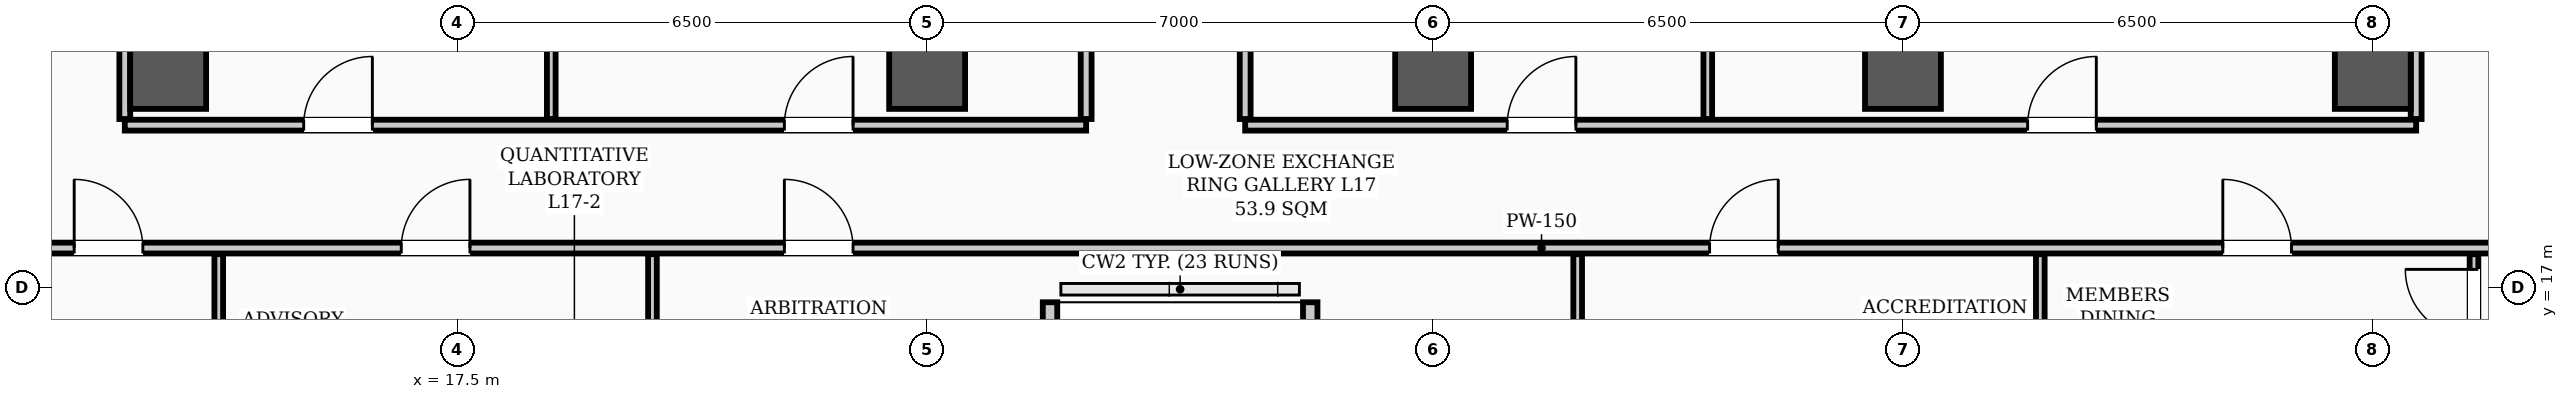
"""IFC4 building model, lengths in metres.
Left out: names, types, materials, properties, quantities, classifications, styles, units other than length and angle.
Written with IfcOpenShell. Run it as: python <this file> out.ifc"""

import sys

from ifc_helpers import new_model, si_unit, direction, frame, frame_2d, origin, origin_2d, place, context, subcontext, project, spatial, rectangle, hollow_rectangle, extrude, element, fill, save


model = new_model("IFC4")
c1 = context("Model", 3, precision=1e-05, world=origin(), true_north=direction((0.0, 1.0)))
c2 = subcontext(c1, "Body", "Model", "MODEL_VIEW")
j1 = project(units=[si_unit("LENGTHUNIT", "METRE"), si_unit("PLANEANGLEUNIT", "RADIAN")], contexts=[c1])
p1 = place(None, origin())
s1 = spatial("IfcSite", under=j1, at=p1, CompositionType="ELEMENT")
p2 = place(p1, origin())
s2 = spatial("IfcBuilding", under=s1, at=p2, CompositionType="ELEMENT")
p3 = place(p2, frame((0.0, 0.0, 69.4)))
s3 = spatial("IfcBuildingStorey", under=s2, at=p3, CompositionType="ELEMENT", Elevation=69.4)
for number, where, z_axis, x_axis in (
    (1, (13.5, 20.0, 0.0), (0.0, 0.0, 1.0), (1.0, 0.0, 0.0)),
    (2, (24.0, 20.0, 0.0), (0.0, 0.0, 1.0), (1.0, 0.0, 0.0)),
    (3, (31.0, 20.0, 0.0), (0.0, 0.0, 1.0), (1.0, 0.0, 0.0)),
    (4, (37.5, 20.0, 0.0), (0.0, 0.0, 1.0), (1.0, 0.0, 0.0)),
    (5, (44.0, 20.0, 0.0), (0.0, 0.0, 1.0), (1.0, 0.0, 0.0)),
):
    element("IfcColumn", number, at=place(p3, frame(where, z_axis=z_axis, x_axis=x_axis)), inside=s3, PredefinedType="COLUMN", context=c2, shape_type="SweptSolid", body=[
        extrude(hollow_rectangle(XDim=1.05, YDim=1.05, WallThickness=0.038, InnerFilletRadius=0.019, OuterFilletRadius=0.057, at=origin_2d()), origin(), (0.0, 0.0, 1.0), 3.9),
    ])
for number, where, z_axis, x_axis in (
    (6, (25.7, 15.1, 0.0), (0.0, 0.0, 1.0), (0.0, 1.0, 0.0)),
    (7, (29.3, 16.8, 0.0), (0.0, 0.0, 1.0), (0.0, -1.0, 0.0)),
):
    element("IfcWall", number, at=place(p3, frame(where, z_axis=z_axis, x_axis=x_axis)), inside=s3, PredefinedType="PARAPET", context=c2, shape_type="SweptSolid", body=[
        extrude(rectangle(XDim=1.7, YDim=0.2, at=frame_2d((0.85, 0.0))), origin(), (0.0, 0.0, 1.0), 1.2),
    ])
p4 = place(p3, frame((10.16, 17.55, 0.0), z_axis=(0.0, 0.0, 1.0), x_axis=(1.0, 0.0, 0.0)))
e8 = element("IfcWall", 8, at=p4, inside=s3, PredefinedType="PARTITIONING", context=c2, shape_type="SweptSolid", body=[
    extrude(rectangle(XDim=44.68, YDim=0.15, at=frame_2d((22.34, 0.0))), origin(), (0.0, 0.0, 1.0), 3.1),
])
p5 = place(p4, frame((2.04, 0.0, 0.0)))
e9 = element("IfcOpeningElement", 9, at=p5, cuts=e8, PredefinedType="OPENING", context=c2, shape_type="SweptSolid", body=[
    extrude(rectangle(XDim=0.95, YDim=2.08, at=frame_2d((0.475, 1.04))), frame((0.0, 0.085, 0.0), z_axis=(0.0, -1.0, 0.0), x_axis=(1.0, 0.0, 0.0)), (0.0, 0.0, 1.0), 0.17),
])
p6 = place(p4, frame((6.565, 0.0, 0.0)))
e10 = element("IfcOpeningElement", 10, at=p6, cuts=e8, PredefinedType="OPENING", context=c2, shape_type="SweptSolid", body=[
    extrude(rectangle(XDim=0.95, YDim=2.08, at=frame_2d((0.475, 1.04))), frame((0.0, 0.085, 0.0), z_axis=(0.0, -1.0, 0.0), x_axis=(1.0, 0.0, 0.0)), (0.0, 0.0, 1.0), 0.17),
])
p7 = place(p4, frame((11.865, 0.0, 0.0)))
e11 = element("IfcOpeningElement", 11, at=p7, cuts=e8, PredefinedType="OPENING", context=c2, shape_type="SweptSolid", body=[
    extrude(rectangle(XDim=0.95, YDim=2.08, at=frame_2d((0.475, 1.04))), frame((0.0, 0.085, 0.0), z_axis=(0.0, -1.0, 0.0), x_axis=(1.0, 0.0, 0.0)), (0.0, 0.0, 1.0), 0.17),
])
p8 = place(p4, frame((24.665, 0.0, 0.0)))
e12 = element("IfcOpeningElement", 12, at=p8, cuts=e8, PredefinedType="OPENING", context=c2, shape_type="SweptSolid", body=[
    extrude(rectangle(XDim=0.95, YDim=2.08, at=frame_2d((0.475, 1.04))), frame((0.0, 0.085, 0.0), z_axis=(0.0, -1.0, 0.0), x_axis=(1.0, 0.0, 0.0)), (0.0, 0.0, 1.0), 0.17),
])
p9 = place(p4, frame((31.765, 0.0, 0.0)))
e13 = element("IfcOpeningElement", 13, at=p9, cuts=e8, PredefinedType="OPENING", context=c2, shape_type="SweptSolid", body=[
    extrude(rectangle(XDim=0.95, YDim=2.08, at=frame_2d((0.475, 1.04))), frame((0.0, 0.085, 0.0), z_axis=(0.0, -1.0, 0.0), x_axis=(1.0, 0.0, 0.0)), (0.0, 0.0, 1.0), 0.17),
])
p10 = place(p3, frame((12.9, 19.25, 0.0), z_axis=(0.0, 0.0, 1.0), x_axis=(1.0, 0.0, 0.0)))
e14 = element("IfcWall", 14, at=p10, inside=s3, PredefinedType="PARTITIONING", context=c2, shape_type="SweptSolid", body=[
    extrude(rectangle(XDim=13.3, YDim=0.15, at=frame_2d((6.65, 0.0))), origin(), (0.0, 0.0, 1.0), 3.1),
])
p11 = place(p10, frame((2.475, 0.0, 0.0)))
e15 = element("IfcOpeningElement", 15, at=p11, cuts=e14, PredefinedType="OPENING", context=c2, shape_type="SweptSolid", body=[
    extrude(rectangle(XDim=0.95, YDim=2.08, at=frame_2d((0.475, 1.04))), frame((0.0, 0.085, 0.0), z_axis=(0.0, -1.0, 0.0), x_axis=(1.0, 0.0, 0.0)), (0.0, 0.0, 1.0), 0.17),
])
p12 = place(p10, frame((9.125, 0.0, 0.0)))
e16 = element("IfcOpeningElement", 16, at=p12, cuts=e14, PredefinedType="OPENING", context=c2, shape_type="SweptSolid", body=[
    extrude(rectangle(XDim=0.95, YDim=2.08, at=frame_2d((0.475, 1.04))), frame((0.0, 0.085, 0.0), z_axis=(0.0, -1.0, 0.0), x_axis=(1.0, 0.0, 0.0)), (0.0, 0.0, 1.0), 0.17),
])
p13 = place(p3, frame((28.4, 19.25, 0.0), z_axis=(0.0, 0.0, 1.0), x_axis=(1.0, 0.0, 0.0)))
e17 = element("IfcWall", 17, at=p13, inside=s3, PredefinedType="PARTITIONING", context=c2, shape_type="SweptSolid", body=[
    extrude(rectangle(XDim=16.2, YDim=0.15, at=frame_2d((8.1, 0.0))), origin(), (0.0, 0.0, 1.0), 3.1),
])
p14 = place(p13, frame((3.625, 0.0, 0.0)))
e18 = element("IfcOpeningElement", 18, at=p14, cuts=e17, PredefinedType="OPENING", context=c2, shape_type="SweptSolid", body=[
    extrude(rectangle(XDim=0.95, YDim=2.08, at=frame_2d((0.475, 1.04))), frame((0.0, 0.085, 0.0), z_axis=(0.0, -1.0, 0.0), x_axis=(1.0, 0.0, 0.0)), (0.0, 0.0, 1.0), 0.17),
])
p15 = place(p13, frame((10.825, 0.0, 0.0)))
e19 = element("IfcOpeningElement", 19, at=p15, cuts=e17, PredefinedType="OPENING", context=c2, shape_type="SweptSolid", body=[
    extrude(rectangle(XDim=0.95, YDim=2.08, at=frame_2d((0.475, 1.04))), frame((0.0, 0.085, 0.0), z_axis=(0.0, -1.0, 0.0), x_axis=(1.0, 0.0, 0.0)), (0.0, 0.0, 1.0), 0.17),
])
for number, where, z_axis, x_axis in (
    (20, (26.2, 19.335, 0.0), (0.0, 0.0, 1.0), (0.0, 1.0, 0.0)),
    (21, (28.4, 19.335, 0.0), (0.0, 0.0, 1.0), (0.0, 1.0, 0.0)),
    (22, (12.9, 19.335, 0.0), (0.0, 0.0, 1.0), (0.0, 1.0, 0.0)),
    (23, (44.6, 19.335, 0.0), (0.0, 0.0, 1.0), (0.0, 1.0, 0.0)),
):
    element("IfcWall", number, at=place(p3, frame(where, z_axis=z_axis, x_axis=x_axis)), inside=s3, PredefinedType="PARTITIONING", context=c2, shape_type="SweptSolid", body=[
        extrude(rectangle(XDim=7.38, YDim=0.15, at=frame_2d((3.69, 0.0))), origin(), (0.0, 0.0, 1.0), 3.0),
    ])
for number, where, z_axis, x_axis in (
    (24, (14.2, 15.31, 0.0), (0.0, 0.0, 1.0), (0.0, 1.0, 0.0)),
    (25, (20.2, 15.31, 0.0), (0.0, 0.0, 1.0), (0.0, 1.0, 0.0)),
    (26, (33.0, 15.31, 0.0), (0.0, 0.0, 1.0), (0.0, 1.0, 0.0)),
    (27, (39.4, 15.31, 0.0), (0.0, 0.0, 1.0), (0.0, 1.0, 0.0)),
):
    element("IfcWall", number, at=place(p3, frame(where, z_axis=z_axis, x_axis=x_axis)), inside=s3, PredefinedType="PARTITIONING", context=c2, shape_type="SweptSolid", body=[
        extrude(rectangle(XDim=2.155, YDim=0.12, at=frame_2d((1.078, 0.0))), origin(), (0.0, 0.0, 1.0), 3.212),
    ])
p16 = place(p3, frame((45.4, 15.31, 0.0), z_axis=(0.0, 0.0, 1.0), x_axis=(0.0, 1.0, 0.0)))
e28 = element("IfcWall", 28, at=p16, inside=s3, PredefinedType="PARTITIONING", context=c2, shape_type="SweptSolid", body=[
    extrude(rectangle(XDim=2.155, YDim=0.12, at=frame_2d((1.078, 0.0))), origin(), (0.0, 0.0, 1.0), 3.72),
])
p17 = place(p16, frame((0.995, 0.0, 0.0)))
e29 = element("IfcOpeningElement", 29, at=p17, cuts=e28, PredefinedType="OPENING", context=c2, shape_type="SweptSolid", body=[
    extrude(rectangle(XDim=0.95, YDim=2.08, at=frame_2d((0.475, 1.04))), frame((0.0, 0.07, 0.0), z_axis=(0.0, -1.0, 0.0), x_axis=(1.0, 0.0, 0.0)), (0.0, 0.0, 1.0), 0.14),
])
for number, where, z_axis, x_axis in (
    (30, (18.8, 19.335, 0.0), (0.0, 0.0, 1.0), (0.0, 1.0, 0.0)),
    (31, (34.8, 19.335, 0.0), (0.0, 0.0, 1.0), (0.0, 1.0, 0.0)),
):
    element("IfcWall", number, at=place(p3, frame(where, z_axis=z_axis, x_axis=x_axis)), inside=s3, PredefinedType="PARTITIONING", context=c2, shape_type="SweptSolid", body=[
        extrude(rectangle(XDim=7.38, YDim=0.12, at=frame_2d((3.69, 0.0))), origin(), (0.0, 0.0, 1.0), 3.0),
    ])
p18 = place(p5, origin())
e32 = element("IfcDoor", 32, at=p18, inside=s3, OperationType="SINGLE_SWING_LEFT", PredefinedType="DOOR", context=c2, shape_type="SweptSolid", body=[
    extrude(rectangle(XDim=0.95, YDim=2.08, at=frame_2d((0.475, 1.04))), frame((0.0, 0.025, 0.0), z_axis=(0.0, -1.0, 0.0), x_axis=(1.0, 0.0, 0.0)), (0.0, 0.0, 1.0), 0.05),
])
fill(e9, e32)
p19 = place(p6, origin())
e33 = element("IfcDoor", 33, at=p19, inside=s3, OperationType="SINGLE_SWING_RIGHT", PredefinedType="DOOR", context=c2, shape_type="SweptSolid", body=[
    extrude(rectangle(XDim=0.95, YDim=2.08, at=frame_2d((0.475, 1.04))), frame((0.0, 0.025, 0.0), z_axis=(0.0, -1.0, 0.0), x_axis=(1.0, 0.0, 0.0)), (0.0, 0.0, 1.0), 0.05),
])
fill(e10, e33)
p20 = place(p7, origin())
e34 = element("IfcDoor", 34, at=p20, inside=s3, OperationType="SINGLE_SWING_LEFT", PredefinedType="DOOR", context=c2, shape_type="SweptSolid", body=[
    extrude(rectangle(XDim=0.95, YDim=2.08, at=frame_2d((0.475, 1.04))), frame((0.0, 0.025, 0.0), z_axis=(0.0, -1.0, 0.0), x_axis=(1.0, 0.0, 0.0)), (0.0, 0.0, 1.0), 0.05),
])
fill(e11, e34)
p21 = place(p8, origin())
e35 = element("IfcDoor", 35, at=p21, inside=s3, OperationType="SINGLE_SWING_RIGHT", PredefinedType="DOOR", context=c2, shape_type="SweptSolid", body=[
    extrude(rectangle(XDim=0.95, YDim=2.08, at=frame_2d((0.475, 1.04))), frame((0.0, 0.025, 0.0), z_axis=(0.0, -1.0, 0.0), x_axis=(1.0, 0.0, 0.0)), (0.0, 0.0, 1.0), 0.05),
])
fill(e12, e35)
p22 = place(p9, origin())
e36 = element("IfcDoor", 36, at=p22, inside=s3, OperationType="SINGLE_SWING_LEFT", PredefinedType="DOOR", context=c2, shape_type="SweptSolid", body=[
    extrude(rectangle(XDim=0.95, YDim=2.08, at=frame_2d((0.475, 1.04))), frame((0.0, 0.025, 0.0), z_axis=(0.0, -1.0, 0.0), x_axis=(1.0, 0.0, 0.0)), (0.0, 0.0, 1.0), 0.05),
])
fill(e13, e36)
p23 = place(p17, origin())
e37 = element("IfcDoor", 37, at=p23, inside=s3, OperationType="SINGLE_SWING_RIGHT", PredefinedType="DOOR", context=c2, shape_type="SweptSolid", body=[
    extrude(rectangle(XDim=0.95, YDim=2.08, at=frame_2d((0.475, 1.04))), frame((0.0, 0.025, 0.0), z_axis=(0.0, -1.0, 0.0), x_axis=(1.0, 0.0, 0.0)), (0.0, 0.0, 1.0), 0.05),
])
fill(e29, e37)
p24 = place(p11, origin())
e38 = element("IfcDoor", 38, at=p24, inside=s3, OperationType="SINGLE_SWING_RIGHT", PredefinedType="DOOR", context=c2, shape_type="SweptSolid", body=[
    extrude(rectangle(XDim=0.95, YDim=2.08, at=frame_2d((0.475, 1.04))), frame((0.0, 0.025, 0.0), z_axis=(0.0, -1.0, 0.0), x_axis=(1.0, 0.0, 0.0)), (0.0, 0.0, 1.0), 0.05),
])
fill(e15, e38)
p25 = place(p12, origin())
e39 = element("IfcDoor", 39, at=p25, inside=s3, OperationType="SINGLE_SWING_RIGHT", PredefinedType="DOOR", context=c2, shape_type="SweptSolid", body=[
    extrude(rectangle(XDim=0.95, YDim=2.08, at=frame_2d((0.475, 1.04))), frame((0.0, 0.025, 0.0), z_axis=(0.0, -1.0, 0.0), x_axis=(1.0, 0.0, 0.0)), (0.0, 0.0, 1.0), 0.05),
])
fill(e16, e39)
p26 = place(p14, origin())
e40 = element("IfcDoor", 40, at=p26, inside=s3, OperationType="SINGLE_SWING_RIGHT", PredefinedType="DOOR", context=c2, shape_type="SweptSolid", body=[
    extrude(rectangle(XDim=0.95, YDim=2.08, at=frame_2d((0.475, 1.04))), frame((0.0, 0.025, 0.0), z_axis=(0.0, -1.0, 0.0), x_axis=(1.0, 0.0, 0.0)), (0.0, 0.0, 1.0), 0.05),
])
fill(e18, e40)
p27 = place(p15, origin())
e41 = element("IfcDoor", 41, at=p27, inside=s3, OperationType="SINGLE_SWING_RIGHT", PredefinedType="DOOR", context=c2, shape_type="SweptSolid", body=[
    extrude(rectangle(XDim=0.95, YDim=2.08, at=frame_2d((0.475, 1.04))), frame((0.0, 0.025, 0.0), z_axis=(0.0, -1.0, 0.0), x_axis=(1.0, 0.0, 0.0)), (0.0, 0.0, 1.0), 0.05),
])
fill(e19, e41)
save(model, sys.argv[1])
